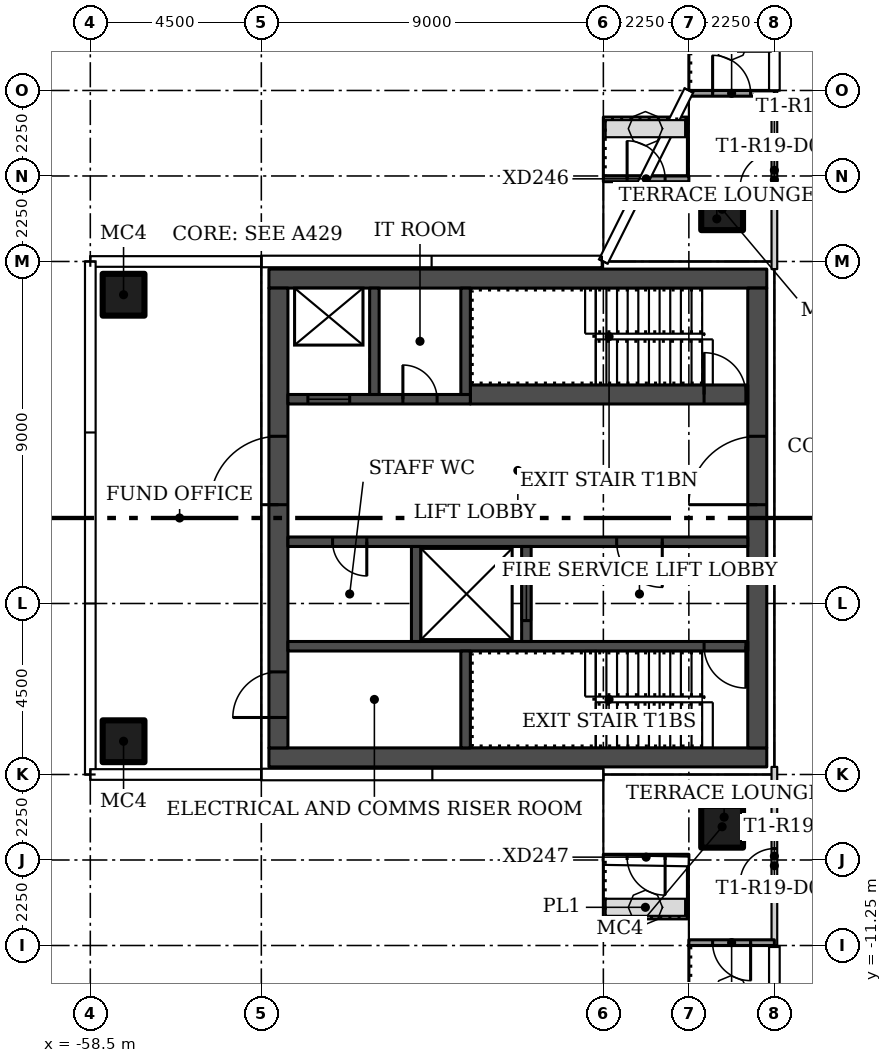
"""IFC4 building model, lengths in metres.
Left out: names, types, materials, properties, quantities, classifications, styles, units other than length and angle.
Written with IfcOpenShell. Run it as: python <this file> out.ifc"""

import sys

from ifc_helpers import new_model, si_unit, direction, frame, frame_2d, origin, origin_2d, place, context, subcontext, project, spatial, rectangle, hollow_rectangle, extrude, element, fill, save


model = new_model("IFC4")
c1 = context("Model", 3, precision=1e-05, world=origin(), true_north=direction((0.0, 1.0)))
c2 = subcontext(c1, "Body", "Model", "MODEL_VIEW")
j1 = project(units=[si_unit("LENGTHUNIT", "METRE"), si_unit("PLANEANGLEUNIT", "RADIAN")], contexts=[c1])
p1 = place(None, origin())
s1 = spatial("IfcSite", under=j1, at=p1, CompositionType="ELEMENT")
p2 = place(p1, origin())
s2 = spatial("IfcBuilding", under=s1, at=p2, CompositionType="ELEMENT")
p3 = place(p2, frame((0.0, 0.0, 170.1)))
s3 = spatial("IfcBuildingStorey", under=s2, at=p3, CompositionType="ELEMENT", Elevation=170.1)
for number, where in (
    (1, (-41.875, 8.125, 0.0)),
    (2, (-41.875, -8.125, 0.0)),
    (3, (-57.625, -5.875, 0.0)),
    (4, (-57.625, 5.875, 0.0)),
):
    element("IfcColumn", number, at=place(p3, frame(where)), inside=s3, PredefinedType="COLUMN", context=c2, shape_type="SweptSolid", body=[
        extrude(hollow_rectangle(XDim=1.1, YDim=1.1, WallThickness=0.04, at=origin_2d()), origin(), (0.0, 0.0, 1.0), 3.55),
    ])
p4 = place(p3, frame((-40.5, -11.25, 0.0), z_axis=(0.0, 0.0, 1.0), x_axis=(0.0, 1.0, 0.0)))
e5 = element("IfcWall", 5, at=p4, inside=s3, PredefinedType="PARTITIONING", context=c2, shape_type="SweptSolid", body=[
    extrude(rectangle(XDim=4.7, YDim=0.15, at=frame_2d((2.35, 0.0))), origin(), (0.0, 0.0, 1.0), 3.55),
])
p5 = place(p4, frame((1.65, 0.0, 0.0)))
e6 = element("IfcOpeningElement", 6, at=p5, cuts=e5, PredefinedType="OPENING", context=c2, shape_type="SweptSolid", body=[
    extrude(rectangle(XDim=0.9, YDim=2.1, at=frame_2d((0.45, 1.05))), frame((0.0, 0.085, 0.0), z_axis=(0.0, -1.0, 0.0), x_axis=(1.0, 0.0, 0.0)), (0.0, 0.0, 1.0), 0.17),
])
p6 = place(p3, frame((-40.5, 6.55, 0.0), z_axis=(0.0, 0.0, 1.0), x_axis=(0.0, 1.0, 0.0)))
e7 = element("IfcWall", 7, at=p6, inside=s3, PredefinedType="PARTITIONING", context=c2, shape_type="SweptSolid", body=[
    extrude(rectangle(XDim=4.7, YDim=0.15, at=frame_2d((2.35, 0.0))), origin(), (0.0, 0.0, 1.0), 3.55),
])
p7 = place(p6, frame((2.15, 0.0, 0.0)))
e8 = element("IfcOpeningElement", 8, at=p7, cuts=e7, PredefinedType="OPENING", context=c2, shape_type="SweptSolid", body=[
    extrude(rectangle(XDim=0.9, YDim=2.1, at=frame_2d((0.45, 1.05))), frame((0.0, 0.085, 0.0), z_axis=(0.0, -1.0, 0.0), x_axis=(1.0, 0.0, 0.0)), (0.0, 0.0, 1.0), 0.17),
])
p8 = place(p3, frame((-42.75, 11.175, 0.0)))
e9 = element("IfcWall", 9, at=p8, inside=s3, PredefinedType="SOLIDWALL", context=c2, shape_type="SweptSolid", body=[
    extrude(rectangle(XDim=2.25, YDim=0.15, at=frame_2d((1.125, 0.0))), origin(), (0.0, 0.0, 1.0), 3.45),
])
p9 = place(p8, frame((0.625, 0.0, 0.0)))
e10 = element("IfcOpeningElement", 10, at=p9, cuts=e9, PredefinedType="OPENING", context=c2, shape_type="SweptSolid", body=[
    extrude(rectangle(XDim=1.0, YDim=2.4, at=frame_2d((0.5, 1.2))), frame((0.0, 0.085, 0.0), z_axis=(0.0, -1.0, 0.0), x_axis=(1.0, 0.0, 0.0)), (0.0, 0.0, 1.0), 0.17),
])
p10 = place(p3, frame((-45.0, 8.925, 0.0)))
e11 = element("IfcWall", 11, at=p10, inside=s3, PredefinedType="SOLIDWALL", context=c2, shape_type="SweptSolid", body=[
    extrude(rectangle(XDim=2.25, YDim=0.15, at=frame_2d((1.125, 0.0))), origin(), (0.0, 0.0, 1.0), 3.45),
])
p11 = place(p10, frame((0.625, 0.0, 0.0)))
e12 = element("IfcOpeningElement", 12, at=p11, cuts=e11, PredefinedType="OPENING", context=c2, shape_type="SweptSolid", body=[
    extrude(rectangle(XDim=1.0, YDim=2.4, at=frame_2d((0.5, 1.2))), frame((0.0, 0.085, 0.0), z_axis=(0.0, -1.0, 0.0), x_axis=(1.0, 0.0, 0.0)), (0.0, 0.0, 1.0), 0.17),
])
p12 = place(p3, frame((-42.75, -8.925, 0.0), z_axis=(0.0, 0.0, 1.0), x_axis=(-1.0, 0.0, 0.0)))
e13 = element("IfcWall", 13, at=p12, inside=s3, PredefinedType="SOLIDWALL", context=c2, shape_type="SweptSolid", body=[
    extrude(rectangle(XDim=2.25, YDim=0.15, at=frame_2d((1.125, 0.0))), origin(), (0.0, 0.0, 1.0), 3.45),
])
p13 = place(p12, frame((0.625, 0.0, 0.0)))
e14 = element("IfcOpeningElement", 14, at=p13, cuts=e13, PredefinedType="OPENING", context=c2, shape_type="SweptSolid", body=[
    extrude(rectangle(XDim=1.0, YDim=2.4, at=frame_2d((0.5, 1.2))), frame((0.0, 0.085, 0.0), z_axis=(0.0, -1.0, 0.0), x_axis=(1.0, 0.0, 0.0)), (0.0, 0.0, 1.0), 0.17),
])
p14 = place(p3, frame((-40.5, -11.175, 0.0), z_axis=(0.0, 0.0, 1.0), x_axis=(-1.0, 0.0, 0.0)))
e15 = element("IfcWall", 15, at=p14, inside=s3, PredefinedType="SOLIDWALL", context=c2, shape_type="SweptSolid", body=[
    extrude(rectangle(XDim=2.25, YDim=0.15, at=frame_2d((1.125, 0.0))), origin(), (0.0, 0.0, 1.0), 3.45),
])
p15 = place(p14, frame((0.625, 0.0, 0.0)))
e16 = element("IfcOpeningElement", 16, at=p15, cuts=e15, PredefinedType="OPENING", context=c2, shape_type="SweptSolid", body=[
    extrude(rectangle(XDim=1.0, YDim=2.4, at=frame_2d((0.5, 1.2))), frame((0.0, 0.085, 0.0), z_axis=(0.0, -1.0, 0.0), x_axis=(1.0, 0.0, 0.0)), (0.0, 0.0, 1.0), 0.17),
])
for number, where, z_axis, x_axis in (
    (17, (-40.7, -6.3, 0.0), (0.0, 0.0, 1.0), (-1.0, 0.0, 0.0)),
    (18, (-40.7, 6.3, 0.0), (0.0, 0.0, 1.0), (-1.0, 0.0, 0.0)),
):
    element("IfcWall", number, at=place(p3, frame(where, z_axis=z_axis, x_axis=x_axis)), inside=s3, PredefinedType="SHEAR", context=c2, shape_type="SweptSolid", body=[
        extrude(rectangle(XDim=13.1, YDim=0.5, at=frame_2d((6.55, 0.0))), origin(), (0.0, 0.0, 1.0), 3.55),
    ])
p16 = place(p3, frame((-40.95, -6.05, 0.0), z_axis=(0.0, 0.0, 1.0), x_axis=(0.0, 1.0, 0.0)))
e19 = element("IfcWall", 19, at=p16, inside=s3, PredefinedType="SHEAR", context=c2, shape_type="SweptSolid", body=[
    extrude(rectangle(XDim=12.1, YDim=0.5, at=frame_2d((6.05, 0.0))), origin(), (0.0, 0.0, 1.0), 3.55),
])
p17 = place(p16, frame((6.4, 0.0, 0.0)))
e20 = element("IfcOpeningElement", 20, at=p17, cuts=e19, PredefinedType="OPENING", context=c2, shape_type="SweptSolid", body=[
    extrude(rectangle(XDim=1.8, YDim=2.4, at=frame_2d((0.9, 1.2))), frame((0.0, 0.26, 0.0), z_axis=(0.0, -1.0, 0.0), x_axis=(1.0, 0.0, 0.0)), (0.0, 0.0, 1.0), 0.52),
])
p18 = place(p3, frame((-53.55, -6.05, 0.0), z_axis=(0.0, 0.0, 1.0), x_axis=(0.0, 1.0, 0.0)))
e21 = element("IfcWall", 21, at=p18, inside=s3, PredefinedType="SHEAR", context=c2, shape_type="SweptSolid", body=[
    extrude(rectangle(XDim=12.1, YDim=0.5, at=frame_2d((6.05, 0.0))), origin(), (0.0, 0.0, 1.0), 3.55),
])
p19 = place(p18, frame((0.8, 0.0, 0.0)))
e22 = element("IfcOpeningElement", 22, at=p19, cuts=e21, PredefinedType="OPENING", context=c2, shape_type="SweptSolid", body=[
    extrude(rectangle(XDim=1.2, YDim=2.1, at=frame_2d((0.6, 1.05))), frame((0.0, 0.26, 0.0), z_axis=(0.0, -1.0, 0.0), x_axis=(1.0, 0.0, 0.0)), (0.0, 0.0, 1.0), 0.52),
])
p20 = place(p18, frame((6.4, 0.0, 0.0)))
e23 = element("IfcOpeningElement", 23, at=p20, cuts=e21, PredefinedType="OPENING", context=c2, shape_type="SweptSolid", body=[
    extrude(rectangle(XDim=1.8, YDim=2.4, at=frame_2d((0.9, 1.2))), frame((0.0, 0.26, 0.0), z_axis=(0.0, -1.0, 0.0), x_axis=(1.0, 0.0, 0.0)), (0.0, 0.0, 1.0), 0.52),
])
p21 = place(p3, frame((-41.2, -3.375, 0.0), z_axis=(0.0, 0.0, 1.0), x_axis=(-1.0, 0.0, 0.0)))
e24 = element("IfcWall", 24, at=p21, inside=s3, PredefinedType="SHEAR", context=c2, shape_type="SweptSolid", body=[
    extrude(rectangle(XDim=12.1, YDim=0.25, at=frame_2d((6.05, 0.0))), origin(), (0.0, 0.0, 1.0), 3.55),
])
p22 = place(p21, frame((0.05, 0.0, 0.0)))
e25 = element("IfcOpeningElement", 25, at=p22, cuts=e24, PredefinedType="OPENING", context=c2, shape_type="SweptSolid", body=[
    extrude(rectangle(XDim=1.1, YDim=2.1, at=frame_2d((0.55, 1.05))), frame((0.0, 0.135, 0.0), z_axis=(0.0, -1.0, 0.0), x_axis=(1.0, 0.0, 0.0)), (0.0, 0.0, 1.0), 0.27),
])
p23 = place(p3, frame((-48.625, -6.05, 0.0), z_axis=(0.0, 0.0, 1.0), x_axis=(0.0, 1.0, 0.0)))
e26 = element("IfcWall", 26, at=p23, inside=s3, PredefinedType="SHEAR", context=c2, shape_type="SweptSolid", body=[
    extrude(rectangle(XDim=2.55, YDim=0.25, at=frame_2d((1.275, 0.0))), origin(), (0.0, 0.0, 1.0), 3.55),
])
p24 = place(p3, frame((-41.2, -0.625, 0.0), z_axis=(0.0, 0.0, 1.0), x_axis=(-1.0, 0.0, 0.0)))
e27 = element("IfcWall", 27, at=p24, inside=s3, PredefinedType="SHEAR", context=c2, shape_type="SweptSolid", body=[
    extrude(rectangle(XDim=12.1, YDim=0.25, at=frame_2d((6.05, 0.0))), origin(), (0.0, 0.0, 1.0), 3.55),
])
p25 = place(p24, frame((2.25, 0.0, 0.0)))
e28 = element("IfcOpeningElement", 28, at=p25, cuts=e27, PredefinedType="OPENING", context=c2, shape_type="SweptSolid", body=[
    extrude(rectangle(XDim=1.2, YDim=2.1, at=frame_2d((0.6, 1.05))), frame((0.0, 0.135, 0.0), z_axis=(0.0, -1.0, 0.0), x_axis=(1.0, 0.0, 0.0)), (0.0, 0.0, 1.0), 0.27),
])
p26 = place(p24, frame((10.025, 0.0, 0.0)))
e29 = element("IfcOpeningElement", 29, at=p26, cuts=e27, PredefinedType="OPENING", context=c2, shape_type="SweptSolid", body=[
    extrude(rectangle(XDim=0.9, YDim=2.1, at=frame_2d((0.45, 1.05))), frame((0.0, 0.135, 0.0), z_axis=(0.0, -1.0, 0.0), x_axis=(1.0, 0.0, 0.0)), (0.0, 0.0, 1.0), 0.27),
])
p27 = place(p3, frame((-47.025, -3.25, 0.0), z_axis=(0.0, 0.0, 1.0), x_axis=(0.0, 1.0, 0.0)))
e30 = element("IfcWall", 30, at=p27, inside=s3, PredefinedType="SHEAR", context=c2, shape_type="SweptSolid", body=[
    extrude(rectangle(XDim=2.5, YDim=0.25, at=frame_2d((1.25, 0.0))), origin(), (0.0, 0.0, 1.0), 3.55),
])
p28 = place(p27, frame((0.55, 0.0, 0.0)))
e31 = element("IfcOpeningElement", 31, at=p28, cuts=e30, PredefinedType="OPENING", context=c2, shape_type="SweptSolid", body=[
    extrude(rectangle(XDim=1.4, YDim=2.4, at=frame_2d((0.7, 1.2))), frame((0.0, 0.135, 0.0), z_axis=(0.0, -1.0, 0.0), x_axis=(1.0, 0.0, 0.0)), (0.0, 0.0, 1.0), 0.27),
])
p29 = place(p3, frame((-49.925, -3.25, 0.0), z_axis=(0.0, 0.0, 1.0), x_axis=(0.0, 1.0, 0.0)))
e32 = element("IfcWall", 32, at=p29, inside=s3, PredefinedType="SHEAR", context=c2, shape_type="SweptSolid", body=[
    extrude(rectangle(XDim=2.5, YDim=0.25, at=frame_2d((1.25, 0.0))), origin(), (0.0, 0.0, 1.0), 3.55),
])
p30 = place(p3, frame((-48.5, 3.25, 0.0)))
e33 = element("IfcWall", 33, at=p30, inside=s3, PredefinedType="SHEAR", context=c2, shape_type="SweptSolid", body=[
    extrude(rectangle(XDim=7.3, YDim=0.5, at=frame_2d((3.65, 0.0))), origin(), (0.0, 0.0, 1.0), 3.55),
])
p31 = place(p30, frame((6.15, 0.0, 0.0)))
e34 = element("IfcOpeningElement", 34, at=p31, cuts=e33, PredefinedType="OPENING", context=c2, shape_type="SweptSolid", body=[
    extrude(rectangle(XDim=1.1, YDim=2.1, at=frame_2d((0.55, 1.05))), frame((0.0, 0.26, 0.0), z_axis=(0.0, -1.0, 0.0), x_axis=(1.0, 0.0, 0.0)), (0.0, 0.0, 1.0), 0.52),
])
p32 = place(p3, frame((-53.3, 3.125, 0.0)))
e35 = element("IfcWall", 35, at=p32, inside=s3, PredefinedType="SHEAR", context=c2, shape_type="SweptSolid", body=[
    extrude(rectangle(XDim=4.8, YDim=0.25, at=frame_2d((2.4, 0.0))), origin(), (0.0, 0.0, 1.0), 3.55),
])
p33 = place(p32, frame((0.525, 0.0, 0.0)))
e36 = element("IfcOpeningElement", 36, at=p33, cuts=e35, PredefinedType="OPENING", context=c2, shape_type="SweptSolid", body=[
    extrude(rectangle(XDim=1.1, YDim=2.1, at=frame_2d((0.55, 1.05))), frame((0.0, 0.135, 0.0), z_axis=(0.0, -1.0, 0.0), x_axis=(1.0, 0.0, 0.0)), (0.0, 0.0, 1.0), 0.27),
])
p34 = place(p32, frame((3.025, 0.0, 0.0)))
e37 = element("IfcOpeningElement", 37, at=p34, cuts=e35, PredefinedType="OPENING", context=c2, shape_type="SweptSolid", body=[
    extrude(rectangle(XDim=0.9, YDim=2.1, at=frame_2d((0.45, 1.05))), frame((0.0, 0.135, 0.0), z_axis=(0.0, -1.0, 0.0), x_axis=(1.0, 0.0, 0.0)), (0.0, 0.0, 1.0), 0.27),
])
for number, where, z_axis, x_axis in (
    (38, (-48.625, 3.25, 0.0), (0.0, 0.0, 1.0), (0.0, 1.0, 0.0)),
    (39, (-51.025, 3.25, 0.0), (0.0, 0.0, 1.0), (0.0, 1.0, 0.0)),
):
    element("IfcWall", number, at=place(p3, frame(where, z_axis=z_axis, x_axis=x_axis)), inside=s3, PredefinedType="SHEAR", context=c2, shape_type="SweptSolid", body=[
        extrude(rectangle(XDim=2.8, YDim=0.25, at=frame_2d((1.4, 0.0))), origin(), (0.0, 0.0, 1.0), 3.55),
    ])
p35 = place(p5, origin())
e40 = element("IfcDoor", 40, at=p35, inside=s3, OperationType="SINGLE_SWING_LEFT", PredefinedType="DOOR", context=c2, shape_type="SweptSolid", body=[
    extrude(rectangle(XDim=0.9, YDim=2.1, at=frame_2d((0.45, 1.05))), frame((0.0, 0.025, 0.0), z_axis=(0.0, -1.0, 0.0), x_axis=(1.0, 0.0, 0.0)), (0.0, 0.0, 1.0), 0.05),
])
fill(e6, e40)
p36 = place(p7, origin())
e41 = element("IfcDoor", 41, at=p36, inside=s3, OperationType="SINGLE_SWING_RIGHT", PredefinedType="DOOR", context=c2, shape_type="SweptSolid", body=[
    extrude(rectangle(XDim=0.9, YDim=2.1, at=frame_2d((0.45, 1.05))), frame((0.0, 0.025, 0.0), z_axis=(0.0, -1.0, 0.0), x_axis=(1.0, 0.0, 0.0)), (0.0, 0.0, 1.0), 0.05),
])
fill(e8, e41)
p37 = place(p9, origin())
e42 = element("IfcDoor", 42, at=p37, inside=s3, OperationType="SINGLE_SWING_LEFT", PredefinedType="DOOR", context=c2, shape_type="SweptSolid", body=[
    extrude(rectangle(XDim=1.0, YDim=2.4, at=frame_2d((0.5, 1.2))), frame((0.0, 0.025, 0.0), z_axis=(0.0, -1.0, 0.0), x_axis=(1.0, 0.0, 0.0)), (0.0, 0.0, 1.0), 0.05),
])
fill(e10, e42)
p38 = place(p11, origin())
e43 = element("IfcDoor", 43, at=p38, inside=s3, OperationType="SINGLE_SWING_RIGHT", PredefinedType="DOOR", context=c2, shape_type="SweptSolid", body=[
    extrude(rectangle(XDim=1.0, YDim=2.4, at=frame_2d((0.5, 1.2))), frame((0.0, 0.025, 0.0), z_axis=(0.0, -1.0, 0.0), x_axis=(1.0, 0.0, 0.0)), (0.0, 0.0, 1.0), 0.05),
])
fill(e12, e43)
p39 = place(p13, origin())
e44 = element("IfcDoor", 44, at=p39, inside=s3, OperationType="SINGLE_SWING_LEFT", PredefinedType="DOOR", context=c2, shape_type="SweptSolid", body=[
    extrude(rectangle(XDim=1.0, YDim=2.4, at=frame_2d((0.5, 1.2))), frame((0.0, 0.025, 0.0), z_axis=(0.0, -1.0, 0.0), x_axis=(1.0, 0.0, 0.0)), (0.0, 0.0, 1.0), 0.05),
])
fill(e14, e44)
p40 = place(p15, origin())
e45 = element("IfcDoor", 45, at=p40, inside=s3, OperationType="SINGLE_SWING_RIGHT", PredefinedType="DOOR", context=c2, shape_type="SweptSolid", body=[
    extrude(rectangle(XDim=1.0, YDim=2.4, at=frame_2d((0.5, 1.2))), frame((0.0, 0.025, 0.0), z_axis=(0.0, -1.0, 0.0), x_axis=(1.0, 0.0, 0.0)), (0.0, 0.0, 1.0), 0.05),
])
fill(e16, e45)
p41 = place(p17, origin())
e46 = element("IfcDoor", 46, at=p41, inside=s3, OperationType="DOUBLE_DOOR_SINGLE_SWING", PredefinedType="DOOR", context=c2, shape_type="SweptSolid", body=[
    extrude(rectangle(XDim=1.8, YDim=2.4, at=frame_2d((0.9, 1.2))), frame((0.0, 0.025, 0.0), z_axis=(0.0, -1.0, 0.0), x_axis=(1.0, 0.0, 0.0)), (0.0, 0.0, 1.0), 0.05),
])
fill(e20, e46)
p42 = place(p19, origin())
e47 = element("IfcDoor", 47, at=p42, inside=s3, OperationType="SINGLE_SWING_LEFT", PredefinedType="DOOR", context=c2, shape_type="SweptSolid", body=[
    extrude(rectangle(XDim=1.2, YDim=2.1, at=frame_2d((0.6, 1.05))), frame((0.0, 0.025, 0.0), z_axis=(0.0, -1.0, 0.0), x_axis=(1.0, 0.0, 0.0)), (0.0, 0.0, 1.0), 0.05),
])
fill(e22, e47)
p43 = place(p20, origin())
e48 = element("IfcDoor", 48, at=p43, inside=s3, OperationType="DOUBLE_DOOR_SINGLE_SWING", PredefinedType="DOOR", context=c2, shape_type="SweptSolid", body=[
    extrude(rectangle(XDim=1.8, YDim=2.4, at=frame_2d((0.9, 1.2))), frame((0.0, 0.025, 0.0), z_axis=(0.0, -1.0, 0.0), x_axis=(1.0, 0.0, 0.0)), (0.0, 0.0, 1.0), 0.05),
])
fill(e23, e48)
p44 = place(p22, origin())
e49 = element("IfcDoor", 49, at=p44, inside=s3, OperationType="SINGLE_SWING_LEFT", PredefinedType="DOOR", context=c2, shape_type="SweptSolid", body=[
    extrude(rectangle(XDim=1.1, YDim=2.1, at=frame_2d((0.55, 1.05))), frame((0.0, 0.025, 0.0), z_axis=(0.0, -1.0, 0.0), x_axis=(1.0, 0.0, 0.0)), (0.0, 0.0, 1.0), 0.05),
])
fill(e25, e49)
p45 = place(p25, origin())
e50 = element("IfcDoor", 50, at=p45, inside=s3, OperationType="SINGLE_SWING_LEFT", PredefinedType="DOOR", context=c2, shape_type="SweptSolid", body=[
    extrude(rectangle(XDim=1.2, YDim=2.1, at=frame_2d((0.6, 1.05))), frame((0.0, 0.025, 0.0), z_axis=(0.0, -1.0, 0.0), x_axis=(1.0, 0.0, 0.0)), (0.0, 0.0, 1.0), 0.05),
])
fill(e28, e50)
p46 = place(p26, origin())
e51 = element("IfcDoor", 51, at=p46, inside=s3, OperationType="SINGLE_SWING_RIGHT", PredefinedType="DOOR", context=c2, shape_type="SweptSolid", body=[
    extrude(rectangle(XDim=0.9, YDim=2.1, at=frame_2d((0.45, 1.05))), frame((0.0, 0.025, 0.0), z_axis=(0.0, -1.0, 0.0), x_axis=(1.0, 0.0, 0.0)), (0.0, 0.0, 1.0), 0.05),
])
fill(e29, e51)
p47 = place(p28, origin())
e52 = element("IfcDoor", 52, at=p47, inside=s3, OperationType="SLIDING_TO_LEFT", PredefinedType="DOOR", context=c2, shape_type="SweptSolid", body=[
    extrude(rectangle(XDim=1.4, YDim=2.4, at=frame_2d((0.7, 1.2))), frame((0.0, 0.025, 0.0), z_axis=(0.0, -1.0, 0.0), x_axis=(1.0, 0.0, 0.0)), (0.0, 0.0, 1.0), 0.05),
])
fill(e31, e52)
p48 = place(p31, origin())
e53 = element("IfcDoor", 53, at=p48, inside=s3, OperationType="SINGLE_SWING_RIGHT", PredefinedType="DOOR", context=c2, shape_type="SweptSolid", body=[
    extrude(rectangle(XDim=1.1, YDim=2.1, at=frame_2d((0.55, 1.05))), frame((0.0, 0.025, 0.0), z_axis=(0.0, -1.0, 0.0), x_axis=(1.0, 0.0, 0.0)), (0.0, 0.0, 1.0), 0.05),
])
fill(e34, e53)
p49 = place(p33, origin())
e54 = element("IfcDoor", 54, at=p49, inside=s3, OperationType="SLIDING_TO_LEFT", PredefinedType="DOOR", context=c2, shape_type="SweptSolid", body=[
    extrude(rectangle(XDim=1.1, YDim=2.1, at=frame_2d((0.55, 1.05))), frame((0.0, 0.025, 0.0), z_axis=(0.0, -1.0, 0.0), x_axis=(1.0, 0.0, 0.0)), (0.0, 0.0, 1.0), 0.05),
])
fill(e36, e54)
p50 = place(p34, origin())
e55 = element("IfcDoor", 55, at=p50, inside=s3, OperationType="SINGLE_SWING_RIGHT", PredefinedType="DOOR", context=c2, shape_type="SweptSolid", body=[
    extrude(rectangle(XDim=0.9, YDim=2.1, at=frame_2d((0.45, 1.05))), frame((0.0, 0.025, 0.0), z_axis=(0.0, -1.0, 0.0), x_axis=(1.0, 0.0, 0.0)), (0.0, 0.0, 1.0), 0.05),
])
fill(e37, e55)
save(model, sys.argv[1])
